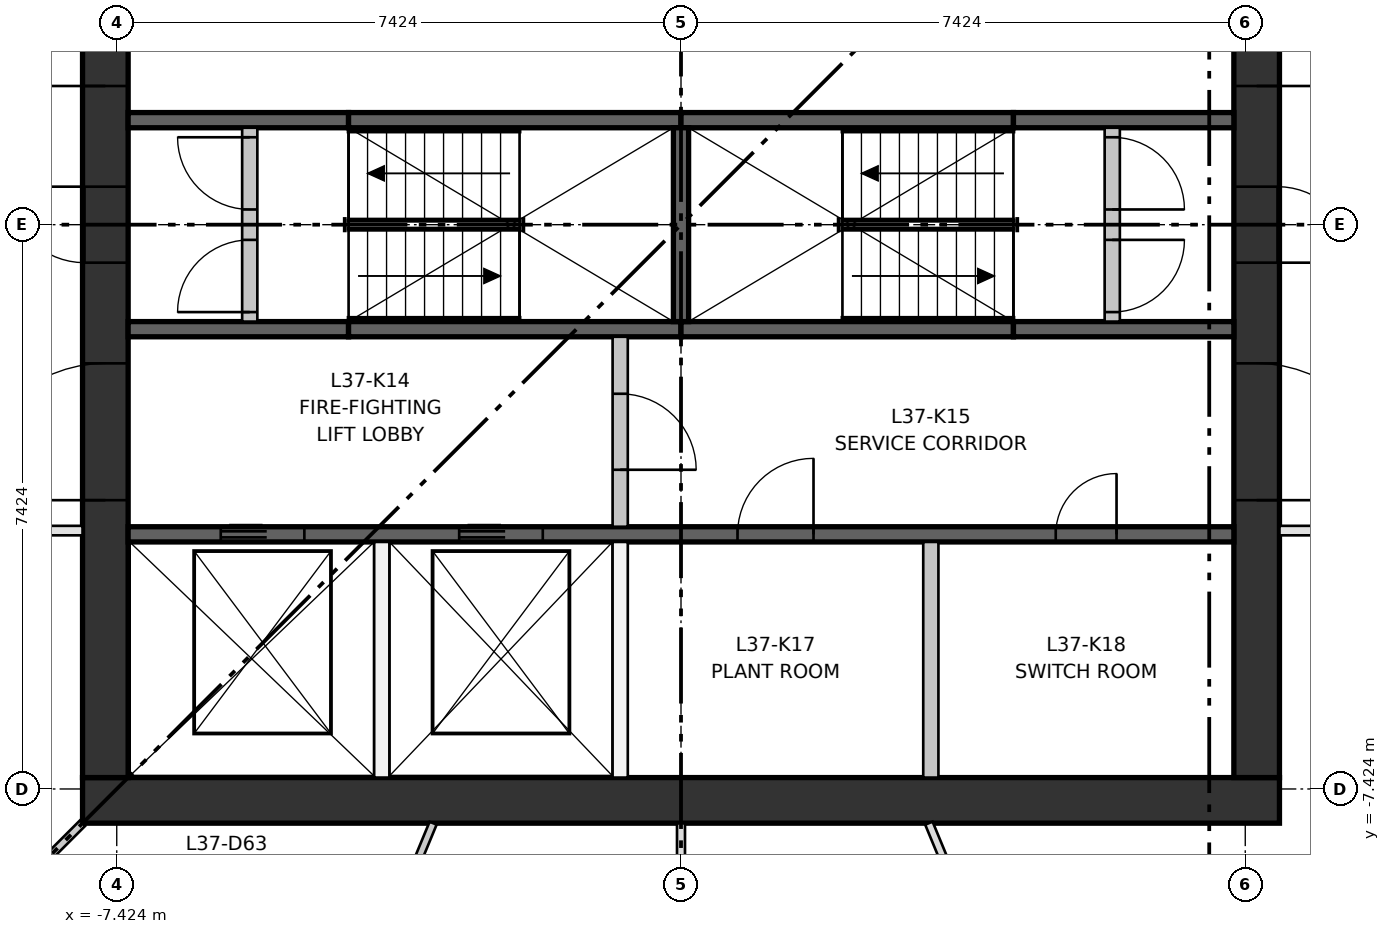
"""IFC4 building model, lengths in metres.
Left out: names, types, materials, properties, quantities, classifications, styles, units other than length and angle.
Written with IfcOpenShell. Run it as: python <this file> out.ifc"""

import sys

from ifc_helpers import new_model, si_unit, direction, frame, frame_2d, origin, place, context, subcontext, project, spatial, rectangle, extrude, element, fill, save


model = new_model("IFC4")
c1 = context("Model", 3, precision=1e-05, world=origin(), true_north=direction((0.0, 1.0)))
c2 = subcontext(c1, "Body", "Model", "MODEL_VIEW")
j1 = project(units=[si_unit("LENGTHUNIT", "METRE"), si_unit("PLANEANGLEUNIT", "RADIAN")], contexts=[c1])
p1 = place(None, origin())
s1 = spatial("IfcSite", under=j1, at=p1, CompositionType="ELEMENT")
p2 = place(p1, origin())
s2 = spatial("IfcBuilding", under=s1, at=p2, CompositionType="ELEMENT")
p3 = place(p2, frame((0.0, 0.0, 141.05)))
s3 = spatial("IfcBuildingStorey", under=s2, at=p3, CompositionType="ELEMENT", Elevation=141.05)
p4 = place(p3, frame((-7.874, -7.574, 0.0), z_axis=(0.0, 0.0, 1.0), x_axis=(1.0, 0.0, 0.0)))
e1 = element("IfcWall", 1, at=p4, inside=s3, PredefinedType="SHEAR", context=c2, shape_type="SweptSolid", body=[
    extrude(rectangle(XDim=15.748, YDim=0.6, at=frame_2d((7.874, 0.0))), origin(), (0.0, 0.0, 1.0), 3.35),
])
p5 = place(p3, frame((-7.574, -7.274, 0.0), z_axis=(0.0, 0.0, 1.0), x_axis=(0.0, 1.0, 0.0)))
e2 = element("IfcWall", 2, at=p5, inside=s3, PredefinedType="SHEAR", context=c2, shape_type="SweptSolid", body=[
    extrude(rectangle(XDim=14.548, YDim=0.6, at=frame_2d((7.274, 0.0))), origin(), (0.0, 0.0, 1.0), 3.35),
])
p6 = place(p5, frame((6.774, 0.0, 0.0)))
e3 = element("IfcOpeningElement", 3, at=p6, cuts=e2, PredefinedType="OPENING", context=c2, shape_type="SweptSolid", body=[
    extrude(rectangle(XDim=1.0, YDim=2.1, at=frame_2d((0.5, 1.05))), frame((0.0, 0.31, 0.0), z_axis=(0.0, -1.0, 0.0), x_axis=(1.0, 0.0, 0.0)), (0.0, 0.0, 1.0), 0.62),
])
p7 = place(p5, frame((3.649, 0.0, 0.0)))
e4 = element("IfcOpeningElement", 4, at=p7, cuts=e2, PredefinedType="OPENING", context=c2, shape_type="SweptSolid", body=[
    extrude(rectangle(XDim=1.8, YDim=2.1, at=frame_2d((0.9, 1.05))), frame((0.0, 0.31, 0.0), z_axis=(0.0, -1.0, 0.0), x_axis=(1.0, 0.0, 0.0)), (0.0, 0.0, 1.0), 0.62),
])
p8 = place(p5, frame((9.098, 0.0, 0.0)))
e5 = element("IfcOpeningElement", 5, at=p8, cuts=e2, PredefinedType="OPENING", context=c2, shape_type="SweptSolid", body=[
    extrude(rectangle(XDim=1.8, YDim=2.1, at=frame_2d((0.9, 1.05))), frame((0.0, 0.31, 0.0), z_axis=(0.0, -1.0, 0.0), x_axis=(1.0, 0.0, 0.0)), (0.0, 0.0, 1.0), 0.62),
])
p9 = place(p3, frame((7.574, -7.274, 0.0), z_axis=(0.0, 0.0, 1.0), x_axis=(0.0, 1.0, 0.0)))
e6 = element("IfcWall", 6, at=p9, inside=s3, PredefinedType="SHEAR", context=c2, shape_type="SweptSolid", body=[
    extrude(rectangle(XDim=14.548, YDim=0.6, at=frame_2d((7.274, 0.0))), origin(), (0.0, 0.0, 1.0), 3.35),
])
p10 = place(p9, frame((6.774, 0.0, 0.0)))
e7 = element("IfcOpeningElement", 7, at=p10, cuts=e6, PredefinedType="OPENING", context=c2, shape_type="SweptSolid", body=[
    extrude(rectangle(XDim=1.0, YDim=2.1, at=frame_2d((0.5, 1.05))), frame((0.0, 0.31, 0.0), z_axis=(0.0, -1.0, 0.0), x_axis=(1.0, 0.0, 0.0)), (0.0, 0.0, 1.0), 0.62),
])
p11 = place(p9, frame((3.649, 0.0, 0.0)))
e8 = element("IfcOpeningElement", 8, at=p11, cuts=e6, PredefinedType="OPENING", context=c2, shape_type="SweptSolid", body=[
    extrude(rectangle(XDim=1.8, YDim=2.1, at=frame_2d((0.9, 1.05))), frame((0.0, 0.31, 0.0), z_axis=(0.0, -1.0, 0.0), x_axis=(1.0, 0.0, 0.0)), (0.0, 0.0, 1.0), 0.62),
])
p12 = place(p9, frame((9.098, 0.0, 0.0)))
e9 = element("IfcOpeningElement", 9, at=p12, cuts=e6, PredefinedType="OPENING", context=c2, shape_type="SweptSolid", body=[
    extrude(rectangle(XDim=1.8, YDim=2.1, at=frame_2d((0.9, 1.05))), frame((0.0, 0.31, 0.0), z_axis=(0.0, -1.0, 0.0), x_axis=(1.0, 0.0, 0.0)), (0.0, 0.0, 1.0), 0.62),
])
p13 = place(p3, frame((-7.274, -4.074, 0.0), z_axis=(0.0, 0.0, 1.0), x_axis=(1.0, 0.0, 0.0)))
e10 = element("IfcWall", 10, at=p13, inside=s3, PredefinedType="SHEAR", context=c2, shape_type="SweptSolid", body=[
    extrude(rectangle(XDim=14.548, YDim=0.2, at=frame_2d((7.274, 0.0))), origin(), (0.0, 0.0, 1.0), 3.0),
])
p14 = place(p13, frame((1.219, 0.0, 0.0)))
e11 = element("IfcOpeningElement", 11, at=p14, cuts=e10, PredefinedType="OPENING", context=c2, shape_type="SweptSolid", body=[
    extrude(rectangle(XDim=1.1, YDim=2.1, at=frame_2d((0.55, 1.05))), frame((0.0, 0.11, 0.0), z_axis=(0.0, -1.0, 0.0), x_axis=(1.0, 0.0, 0.0)), (0.0, 0.0, 1.0), 0.22),
])
p15 = place(p13, frame((4.355, 0.0, 0.0)))
e12 = element("IfcOpeningElement", 12, at=p15, cuts=e10, PredefinedType="OPENING", context=c2, shape_type="SweptSolid", body=[
    extrude(rectangle(XDim=1.1, YDim=2.1, at=frame_2d((0.55, 1.05))), frame((0.0, 0.11, 0.0), z_axis=(0.0, -1.0, 0.0), x_axis=(1.0, 0.0, 0.0)), (0.0, 0.0, 1.0), 0.22),
])
p16 = place(p13, frame((8.018, 0.0, 0.0)))
e13 = element("IfcOpeningElement", 13, at=p16, cuts=e10, PredefinedType="OPENING", context=c2, shape_type="SweptSolid", body=[
    extrude(rectangle(XDim=1.0, YDim=2.1, at=frame_2d((0.5, 1.05))), frame((0.0, 0.11, 0.0), z_axis=(0.0, -1.0, 0.0), x_axis=(1.0, 0.0, 0.0)), (0.0, 0.0, 1.0), 0.22),
])
p17 = place(p13, frame((12.205, 0.0, 0.0)))
e14 = element("IfcOpeningElement", 14, at=p17, cuts=e10, PredefinedType="OPENING", context=c2, shape_type="SweptSolid", body=[
    extrude(rectangle(XDim=0.8, YDim=2.1, at=frame_2d((0.4, 1.05))), frame((0.0, 0.11, 0.0), z_axis=(0.0, -1.0, 0.0), x_axis=(1.0, 0.0, 0.0)), (0.0, 0.0, 1.0), 0.22),
])
p18 = place(p3, frame((-7.274, -1.375, 0.0), z_axis=(0.0, 0.0, 1.0), x_axis=(1.0, 0.0, 0.0)))
e15 = element("IfcWall", 15, at=p18, inside=s3, PredefinedType="SHEAR", context=c2, shape_type="SweptSolid", body=[
    extrude(rectangle(XDim=2.9, YDim=0.2, at=frame_2d((1.45, 0.0))), origin(), (0.0, 0.0, 1.0), 3.0),
])
for number, where, z_axis, x_axis in (
    (16, (-4.374, -1.375, 0.0), (0.0, 0.0, 1.0), (1.0, 0.0, 0.0)),
    (17, (0.0, -1.375, 0.0), (0.0, 0.0, 1.0), (1.0, 0.0, 0.0)),
):
    element("IfcWall", number, at=place(p3, frame(where, z_axis=z_axis, x_axis=x_axis)), inside=s3, PredefinedType="SHEAR", context=c2, shape_type="SweptSolid", body=[
        extrude(rectangle(XDim=4.374, YDim=0.2, at=frame_2d((2.187, 0.0))), origin(), (0.0, 0.0, 1.0), 3.0),
    ])
for number, where, z_axis, x_axis in (
    (18, (4.374, -1.375, 0.0), (0.0, 0.0, 1.0), (1.0, 0.0, 0.0)),
    (19, (-7.274, 1.375, 0.0), (0.0, 0.0, 1.0), (1.0, 0.0, 0.0)),
):
    element("IfcWall", number, at=place(p3, frame(where, z_axis=z_axis, x_axis=x_axis)), inside=s3, PredefinedType="SHEAR", context=c2, shape_type="SweptSolid", body=[
        extrude(rectangle(XDim=2.9, YDim=0.2, at=frame_2d((1.45, 0.0))), origin(), (0.0, 0.0, 1.0), 3.0),
    ])
for number, where, z_axis, x_axis in (
    (20, (-4.374, 1.375, 0.0), (0.0, 0.0, 1.0), (1.0, 0.0, 0.0)),
    (21, (0.0, 1.375, 0.0), (0.0, 0.0, 1.0), (1.0, 0.0, 0.0)),
):
    element("IfcWall", number, at=place(p3, frame(where, z_axis=z_axis, x_axis=x_axis)), inside=s3, PredefinedType="SHEAR", context=c2, shape_type="SweptSolid", body=[
        extrude(rectangle(XDim=4.374, YDim=0.2, at=frame_2d((2.187, 0.0))), origin(), (0.0, 0.0, 1.0), 3.0),
    ])
p19 = place(p3, frame((4.374, 1.375, 0.0), z_axis=(0.0, 0.0, 1.0), x_axis=(1.0, 0.0, 0.0)))
e22 = element("IfcWall", 22, at=p19, inside=s3, PredefinedType="SHEAR", context=c2, shape_type="SweptSolid", body=[
    extrude(rectangle(XDim=2.9, YDim=0.2, at=frame_2d((1.45, 0.0))), origin(), (0.0, 0.0, 1.0), 3.0),
])
p20 = place(p3, frame((0.0, -1.275, 0.0), z_axis=(0.0, 0.0, 1.0), x_axis=(0.0, 1.0, 0.0)))
e23 = element("IfcWall", 23, at=p20, inside=s3, PredefinedType="SHEAR", context=c2, shape_type="SweptSolid", body=[
    extrude(rectangle(XDim=2.55, YDim=0.2, at=frame_2d((1.275, 0.0))), origin(), (0.0, 0.0, 1.0), 3.0),
])
for number, where, z_axis, x_axis in (
    (24, (-3.937, -7.274, 0.0), (0.0, 0.0, 1.0), (0.0, 1.0, 0.0)),
    (25, (-0.8, -7.274, 0.0), (0.0, 0.0, 1.0), (0.0, 1.0, 0.0)),
):
    element("IfcWall", number, at=place(p3, frame(where, z_axis=z_axis, x_axis=x_axis)), inside=s3, PredefinedType="PARTITIONING", context=c2, shape_type="SweptSolid", body=[
        extrude(rectangle(XDim=3.1, YDim=0.2, at=frame_2d((1.55, 0.0))), origin(), (0.0, 0.0, 1.0), 3.0),
    ])
p21 = place(p3, frame((-0.8, -3.974, 0.0), z_axis=(0.0, 0.0, 1.0), x_axis=(0.0, 1.0, 0.0)))
e26 = element("IfcWall", 26, at=p21, inside=s3, PredefinedType="PARTITIONING", context=c2, shape_type="SweptSolid", body=[
    extrude(rectangle(XDim=2.499, YDim=0.2, at=frame_2d((1.25, 0.0))), origin(), (0.0, 0.0, 1.0), 3.0),
])
p22 = place(p21, frame((0.75, 0.0, 0.0)))
e27 = element("IfcOpeningElement", 27, at=p22, cuts=e26, PredefinedType="OPENING", context=c2, shape_type="SweptSolid", body=[
    extrude(rectangle(XDim=1.0, YDim=2.1, at=frame_2d((0.5, 1.05))), frame((0.0, 0.11, 0.0), z_axis=(0.0, -1.0, 0.0), x_axis=(1.0, 0.0, 0.0)), (0.0, 0.0, 1.0), 0.22),
])
p23 = place(p3, frame((3.287, -7.274, 0.0), z_axis=(0.0, 0.0, 1.0), x_axis=(0.0, 1.0, 0.0)))
e28 = element("IfcWall", 28, at=p23, inside=s3, PredefinedType="PARTITIONING", context=c2, shape_type="SweptSolid", body=[
    extrude(rectangle(XDim=3.1, YDim=0.2, at=frame_2d((1.55, 0.0))), origin(), (0.0, 0.0, 1.0), 3.0),
])
p24 = place(p3, frame((-5.674, -1.275, 0.0), z_axis=(0.0, 0.0, 1.0), x_axis=(0.0, 1.0, 0.0)))
e29 = element("IfcWall", 29, at=p24, inside=s3, PredefinedType="PARTITIONING", context=c2, shape_type="SweptSolid", body=[
    extrude(rectangle(XDim=2.55, YDim=0.2, at=frame_2d((1.275, 0.0))), origin(), (0.0, 0.0, 1.0), 3.0),
])
p25 = place(p24, frame((0.125, 0.0, 0.0)))
e30 = element("IfcOpeningElement", 30, at=p25, cuts=e29, PredefinedType="OPENING", context=c2, shape_type="SweptSolid", body=[
    extrude(rectangle(XDim=0.95, YDim=2.1, at=frame_2d((0.475, 1.05))), frame((0.0, 0.11, 0.0), z_axis=(0.0, -1.0, 0.0), x_axis=(1.0, 0.0, 0.0)), (0.0, 0.0, 1.0), 0.22),
])
p26 = place(p24, frame((1.475, 0.0, 0.0)))
e31 = element("IfcOpeningElement", 31, at=p26, cuts=e29, PredefinedType="OPENING", context=c2, shape_type="SweptSolid", body=[
    extrude(rectangle(XDim=0.95, YDim=2.1, at=frame_2d((0.475, 1.05))), frame((0.0, 0.11, 0.0), z_axis=(0.0, -1.0, 0.0), x_axis=(1.0, 0.0, 0.0)), (0.0, 0.0, 1.0), 0.22),
])
p27 = place(p3, frame((5.674, -1.275, 0.0), z_axis=(0.0, 0.0, 1.0), x_axis=(0.0, 1.0, 0.0)))
e32 = element("IfcWall", 32, at=p27, inside=s3, PredefinedType="PARTITIONING", context=c2, shape_type="SweptSolid", body=[
    extrude(rectangle(XDim=2.55, YDim=0.2, at=frame_2d((1.275, 0.0))), origin(), (0.0, 0.0, 1.0), 3.0),
])
p28 = place(p27, frame((0.125, 0.0, 0.0)))
e33 = element("IfcOpeningElement", 33, at=p28, cuts=e32, PredefinedType="OPENING", context=c2, shape_type="SweptSolid", body=[
    extrude(rectangle(XDim=0.95, YDim=2.1, at=frame_2d((0.475, 1.05))), frame((0.0, 0.11, 0.0), z_axis=(0.0, -1.0, 0.0), x_axis=(1.0, 0.0, 0.0)), (0.0, 0.0, 1.0), 0.22),
])
p29 = place(p27, frame((1.475, 0.0, 0.0)))
e34 = element("IfcOpeningElement", 34, at=p29, cuts=e32, PredefinedType="OPENING", context=c2, shape_type="SweptSolid", body=[
    extrude(rectangle(XDim=0.95, YDim=2.1, at=frame_2d((0.475, 1.05))), frame((0.0, 0.11, 0.0), z_axis=(0.0, -1.0, 0.0), x_axis=(1.0, 0.0, 0.0)), (0.0, 0.0, 1.0), 0.22),
])
p30 = place(p3, frame((11.403, -4.024, 0.0), z_axis=(0.0, 0.0, 1.0), x_axis=(-1.0, 0.0, 0.0)))
e35 = element("IfcWall", 35, at=p30, inside=s3, PredefinedType="PARTITIONING", context=c2, shape_type="SweptSolid", body=[
    extrude(rectangle(XDim=3.529, YDim=0.125, at=frame_2d((1.764, 0.0))), origin(), (0.0, 0.0, 1.0), 3.0),
])
p31 = place(p30, frame((0.9, 0.0, 0.0)))
e36 = element("IfcOpeningElement", 36, at=p31, cuts=e35, PredefinedType="OPENING", context=c2, shape_type="SweptSolid", body=[
    extrude(rectangle(XDim=1.8, YDim=2.1, at=frame_2d((0.9, 1.05))), frame((0.0, 0.073, 0.0), z_axis=(0.0, -1.0, 0.0), x_axis=(1.0, 0.0, 0.0)), (0.0, 0.0, 1.0), 0.145),
])
p32 = place(p3, frame((-7.874, -4.024, 0.0), z_axis=(0.0, 0.0, 1.0), x_axis=(-1.0, 0.0, 0.0)))
e37 = element("IfcWall", 37, at=p32, inside=s3, PredefinedType="PARTITIONING", context=c2, shape_type="SweptSolid", body=[
    extrude(rectangle(XDim=3.634, YDim=0.125, at=frame_2d((1.817, 0.0))), origin(), (0.0, 0.0, 1.0), 3.0),
])
p33 = place(p32, frame((1.3, 0.0, 0.0)))
e38 = element("IfcOpeningElement", 38, at=p33, cuts=e37, PredefinedType="OPENING", context=c2, shape_type="SweptSolid", body=[
    extrude(rectangle(XDim=1.0, YDim=2.1, at=frame_2d((0.5, 1.05))), frame((0.0, 0.073, 0.0), z_axis=(0.0, -1.0, 0.0), x_axis=(1.0, 0.0, 0.0)), (0.0, 0.0, 1.0), 0.145),
])
p34 = place(p3, frame((-7.874, -7.874, 0.0), z_axis=(0.0, 0.0, 1.0), x_axis=(-0.707106781187, -0.707106781187, 0.0)))
e39 = element("IfcWall", 39, at=p34, inside=s3, PredefinedType="PARTITIONING", context=c2, shape_type="SweptSolid", body=[
    extrude(rectangle(XDim=6.634, YDim=0.1, at=frame_2d((3.317, 0.0))), origin(), (0.0, 0.0, 1.0), 3.0),
])
p35 = place(p34, frame((2.6, 0.0, 0.0)))
e40 = element("IfcOpeningElement", 40, at=p35, cuts=e39, PredefinedType="OPENING", context=c2, shape_type="SweptSolid", body=[
    extrude(rectangle(XDim=1.0, YDim=2.1, at=frame_2d((0.5, 1.05))), frame((0.0, 0.06, 0.0), z_axis=(0.0, -1.0, 0.0), x_axis=(1.0, 0.0, 0.0)), (0.0, 0.0, 1.0), 0.12),
])
p36 = place(p3, frame((-3.261, -7.874, 0.0), z_axis=(0.0, 0.0, 1.0), x_axis=(-0.382701956612, -0.923871859299, 0.0)))
e41 = element("IfcWall", 41, at=p36, inside=s3, PredefinedType="PARTITIONING", context=c2, shape_type="SweptSolid", body=[
    extrude(rectangle(XDim=4.577, YDim=0.1, at=frame_2d((2.289, 0.0))), origin(), (0.0, 0.0, 1.0), 3.0),
])
p37 = place(p36, frame((1.8, 0.0, 0.0)))
e42 = element("IfcOpeningElement", 42, at=p37, cuts=e41, PredefinedType="OPENING", context=c2, shape_type="SweptSolid", body=[
    extrude(rectangle(XDim=1.0, YDim=2.1, at=frame_2d((0.5, 1.05))), frame((0.0, 0.06, 0.0), z_axis=(0.0, -1.0, 0.0), x_axis=(1.0, 0.0, 0.0)), (0.0, 0.0, 1.0), 0.12),
])
p38 = place(p3, frame((0.0, -7.874, 0.0), z_axis=(0.0, 0.0, 1.0), x_axis=(0.0, -1.0, 0.0)))
e43 = element("IfcWall", 43, at=p38, inside=s3, PredefinedType="PARTITIONING", context=c2, shape_type="SweptSolid", body=[
    extrude(rectangle(XDim=5.226, YDim=0.105, at=frame_2d((2.613, 0.0))), origin(), (0.0, 0.0, 1.0), 3.0),
])
p39 = place(p38, frame((2.1, 0.0, 0.0)))
e44 = element("IfcOpeningElement", 44, at=p39, cuts=e43, PredefinedType="OPENING", context=c2, shape_type="SweptSolid", body=[
    extrude(rectangle(XDim=1.0, YDim=2.1, at=frame_2d((0.5, 1.05))), frame((0.0, 0.062, 0.0), z_axis=(0.0, -1.0, 0.0), x_axis=(1.0, 0.0, 0.0)), (0.0, 0.0, 1.0), 0.125),
])
p40 = place(p3, frame((3.261, -7.874, 0.0), z_axis=(0.0, 0.0, 1.0), x_axis=(0.382701956612, -0.923871859299, 0.0)))
e45 = element("IfcWall", 45, at=p40, inside=s3, PredefinedType="PARTITIONING", context=c2, shape_type="SweptSolid", body=[
    extrude(rectangle(XDim=4.577, YDim=0.105, at=frame_2d((2.289, 0.0))), origin(), (0.0, 0.0, 1.0), 3.0),
])
p41 = place(p14, origin())
e46 = element("IfcDoor", 46, at=p41, inside=s3, OperationType="DOUBLE_DOOR_SLIDING", PredefinedType="DOOR", context=c2, shape_type="SweptSolid", body=[
    extrude(rectangle(XDim=1.1, YDim=2.1, at=frame_2d((0.55, 1.05))), frame((0.0, 0.025, 0.0), z_axis=(0.0, -1.0, 0.0), x_axis=(1.0, 0.0, 0.0)), (0.0, 0.0, 1.0), 0.05),
])
fill(e11, e46)
p42 = place(p15, origin())
e47 = element("IfcDoor", 47, at=p42, inside=s3, OperationType="DOUBLE_DOOR_SLIDING", PredefinedType="DOOR", context=c2, shape_type="SweptSolid", body=[
    extrude(rectangle(XDim=1.1, YDim=2.1, at=frame_2d((0.55, 1.05))), frame((0.0, 0.025, 0.0), z_axis=(0.0, -1.0, 0.0), x_axis=(1.0, 0.0, 0.0)), (0.0, 0.0, 1.0), 0.05),
])
fill(e12, e47)
p43 = place(p25, origin())
e48 = element("IfcDoor", 48, at=p43, inside=s3, OperationType="SINGLE_SWING_LEFT", PredefinedType="DOOR", context=c2, shape_type="SweptSolid", body=[
    extrude(rectangle(XDim=0.95, YDim=2.1, at=frame_2d((0.475, 1.05))), frame((0.0, 0.025, 0.0), z_axis=(0.0, -1.0, 0.0), x_axis=(1.0, 0.0, 0.0)), (0.0, 0.0, 1.0), 0.05),
])
fill(e30, e48)
p44 = place(p26, origin())
e49 = element("IfcDoor", 49, at=p44, inside=s3, OperationType="SINGLE_SWING_RIGHT", PredefinedType="DOOR", context=c2, shape_type="SweptSolid", body=[
    extrude(rectangle(XDim=0.95, YDim=2.1, at=frame_2d((0.475, 1.05))), frame((0.0, 0.025, 0.0), z_axis=(0.0, -1.0, 0.0), x_axis=(1.0, 0.0, 0.0)), (0.0, 0.0, 1.0), 0.05),
])
fill(e31, e49)
p45 = place(p28, frame((0.95, 0.0, 0.0), z_axis=(0.0, 0.0, 1.0), x_axis=(-1.0, 0.0, 0.0)))
e50 = element("IfcDoor", 50, at=p45, inside=s3, OperationType="SINGLE_SWING_RIGHT", PredefinedType="DOOR", context=c2, shape_type="SweptSolid", body=[
    extrude(rectangle(XDim=0.95, YDim=2.1, at=frame_2d((0.475, 1.05))), frame((0.0, 0.025, 0.0), z_axis=(0.0, -1.0, 0.0), x_axis=(1.0, 0.0, 0.0)), (0.0, 0.0, 1.0), 0.05),
])
fill(e33, e50)
p46 = place(p29, frame((0.95, 0.0, 0.0), z_axis=(0.0, 0.0, 1.0), x_axis=(-1.0, 0.0, 0.0)))
e51 = element("IfcDoor", 51, at=p46, inside=s3, OperationType="SINGLE_SWING_LEFT", PredefinedType="DOOR", context=c2, shape_type="SweptSolid", body=[
    extrude(rectangle(XDim=0.95, YDim=2.1, at=frame_2d((0.475, 1.05))), frame((0.0, 0.025, 0.0), z_axis=(0.0, -1.0, 0.0), x_axis=(1.0, 0.0, 0.0)), (0.0, 0.0, 1.0), 0.05),
])
fill(e34, e51)
p47 = place(p22, frame((1.0, 0.0, 0.0), z_axis=(0.0, 0.0, 1.0), x_axis=(-1.0, 0.0, 0.0)))
e52 = element("IfcDoor", 52, at=p47, inside=s3, OperationType="SINGLE_SWING_LEFT", PredefinedType="DOOR", context=c2, shape_type="SweptSolid", body=[
    extrude(rectangle(XDim=1.0, YDim=2.1, at=frame_2d((0.5, 1.05))), frame((0.0, 0.025, 0.0), z_axis=(0.0, -1.0, 0.0), x_axis=(1.0, 0.0, 0.0)), (0.0, 0.0, 1.0), 0.05),
])
fill(e27, e52)
p48 = place(p16, origin())
e53 = element("IfcDoor", 53, at=p48, inside=s3, OperationType="SINGLE_SWING_RIGHT", PredefinedType="DOOR", context=c2, shape_type="SweptSolid", body=[
    extrude(rectangle(XDim=1.0, YDim=2.1, at=frame_2d((0.5, 1.05))), frame((0.0, 0.025, 0.0), z_axis=(0.0, -1.0, 0.0), x_axis=(1.0, 0.0, 0.0)), (0.0, 0.0, 1.0), 0.05),
])
fill(e13, e53)
p49 = place(p17, origin())
e54 = element("IfcDoor", 54, at=p49, inside=s3, OperationType="SINGLE_SWING_RIGHT", PredefinedType="DOOR", context=c2, shape_type="SweptSolid", body=[
    extrude(rectangle(XDim=0.8, YDim=2.1, at=frame_2d((0.4, 1.05))), frame((0.0, 0.025, 0.0), z_axis=(0.0, -1.0, 0.0), x_axis=(1.0, 0.0, 0.0)), (0.0, 0.0, 1.0), 0.05),
])
fill(e14, e54)
p50 = place(p6, origin())
e55 = element("IfcDoor", 55, at=p50, inside=s3, OperationType="SINGLE_SWING_RIGHT", PredefinedType="DOOR", context=c2, shape_type="SweptSolid", body=[
    extrude(rectangle(XDim=1.0, YDim=2.1, at=frame_2d((0.5, 1.05))), frame((0.0, 0.3, 0.0), z_axis=(0.0, -1.0, 0.0), x_axis=(1.0, 0.0, 0.0)), (0.0, 0.0, 1.0), 0.05),
])
fill(e3, e55)
p51 = place(p7, origin())
e56 = element("IfcDoor", 56, at=p51, inside=s3, OperationType="DOUBLE_DOOR_SINGLE_SWING", PredefinedType="DOOR", context=c2, shape_type="SweptSolid", body=[
    extrude(rectangle(XDim=1.8, YDim=2.1, at=frame_2d((0.9, 1.05))), frame((0.0, 0.025, 0.0), z_axis=(0.0, -1.0, 0.0), x_axis=(1.0, 0.0, 0.0)), (0.0, 0.0, 1.0), 0.05),
])
fill(e4, e56)
p52 = place(p8, origin())
e57 = element("IfcDoor", 57, at=p52, inside=s3, OperationType="DOUBLE_DOOR_SINGLE_SWING", PredefinedType="DOOR", context=c2, shape_type="SweptSolid", body=[
    extrude(rectangle(XDim=1.8, YDim=2.1, at=frame_2d((0.9, 1.05))), frame((0.0, 0.025, 0.0), z_axis=(0.0, -1.0, 0.0), x_axis=(1.0, 0.0, 0.0)), (0.0, 0.0, 1.0), 0.05),
])
fill(e5, e57)
p53 = place(p10, frame((1.0, 0.0, 0.0), z_axis=(0.0, 0.0, 1.0), x_axis=(-1.0, 0.0, 0.0)))
e58 = element("IfcDoor", 58, at=p53, inside=s3, OperationType="SINGLE_SWING_LEFT", PredefinedType="DOOR", context=c2, shape_type="SweptSolid", body=[
    extrude(rectangle(XDim=1.0, YDim=2.1, at=frame_2d((0.5, 1.05))), frame((0.0, 0.3, 0.0), z_axis=(0.0, -1.0, 0.0), x_axis=(1.0, 0.0, 0.0)), (0.0, 0.0, 1.0), 0.05),
])
fill(e7, e58)
p54 = place(p11, frame((1.8, 0.0, 0.0), z_axis=(0.0, 0.0, 1.0), x_axis=(-1.0, 0.0, 0.0)))
e59 = element("IfcDoor", 59, at=p54, inside=s3, OperationType="DOUBLE_DOOR_SINGLE_SWING", PredefinedType="DOOR", context=c2, shape_type="SweptSolid", body=[
    extrude(rectangle(XDim=1.8, YDim=2.1, at=frame_2d((0.9, 1.05))), frame((0.0, 0.025, 0.0), z_axis=(0.0, -1.0, 0.0), x_axis=(1.0, 0.0, 0.0)), (0.0, 0.0, 1.0), 0.05),
])
fill(e8, e59)
p55 = place(p12, frame((1.8, 0.0, 0.0), z_axis=(0.0, 0.0, 1.0), x_axis=(-1.0, 0.0, 0.0)))
e60 = element("IfcDoor", 60, at=p55, inside=s3, OperationType="DOUBLE_DOOR_SINGLE_SWING", PredefinedType="DOOR", context=c2, shape_type="SweptSolid", body=[
    extrude(rectangle(XDim=1.8, YDim=2.1, at=frame_2d((0.9, 1.05))), frame((0.0, 0.025, 0.0), z_axis=(0.0, -1.0, 0.0), x_axis=(1.0, 0.0, 0.0)), (0.0, 0.0, 1.0), 0.05),
])
fill(e9, e60)
save(model, sys.argv[1])
